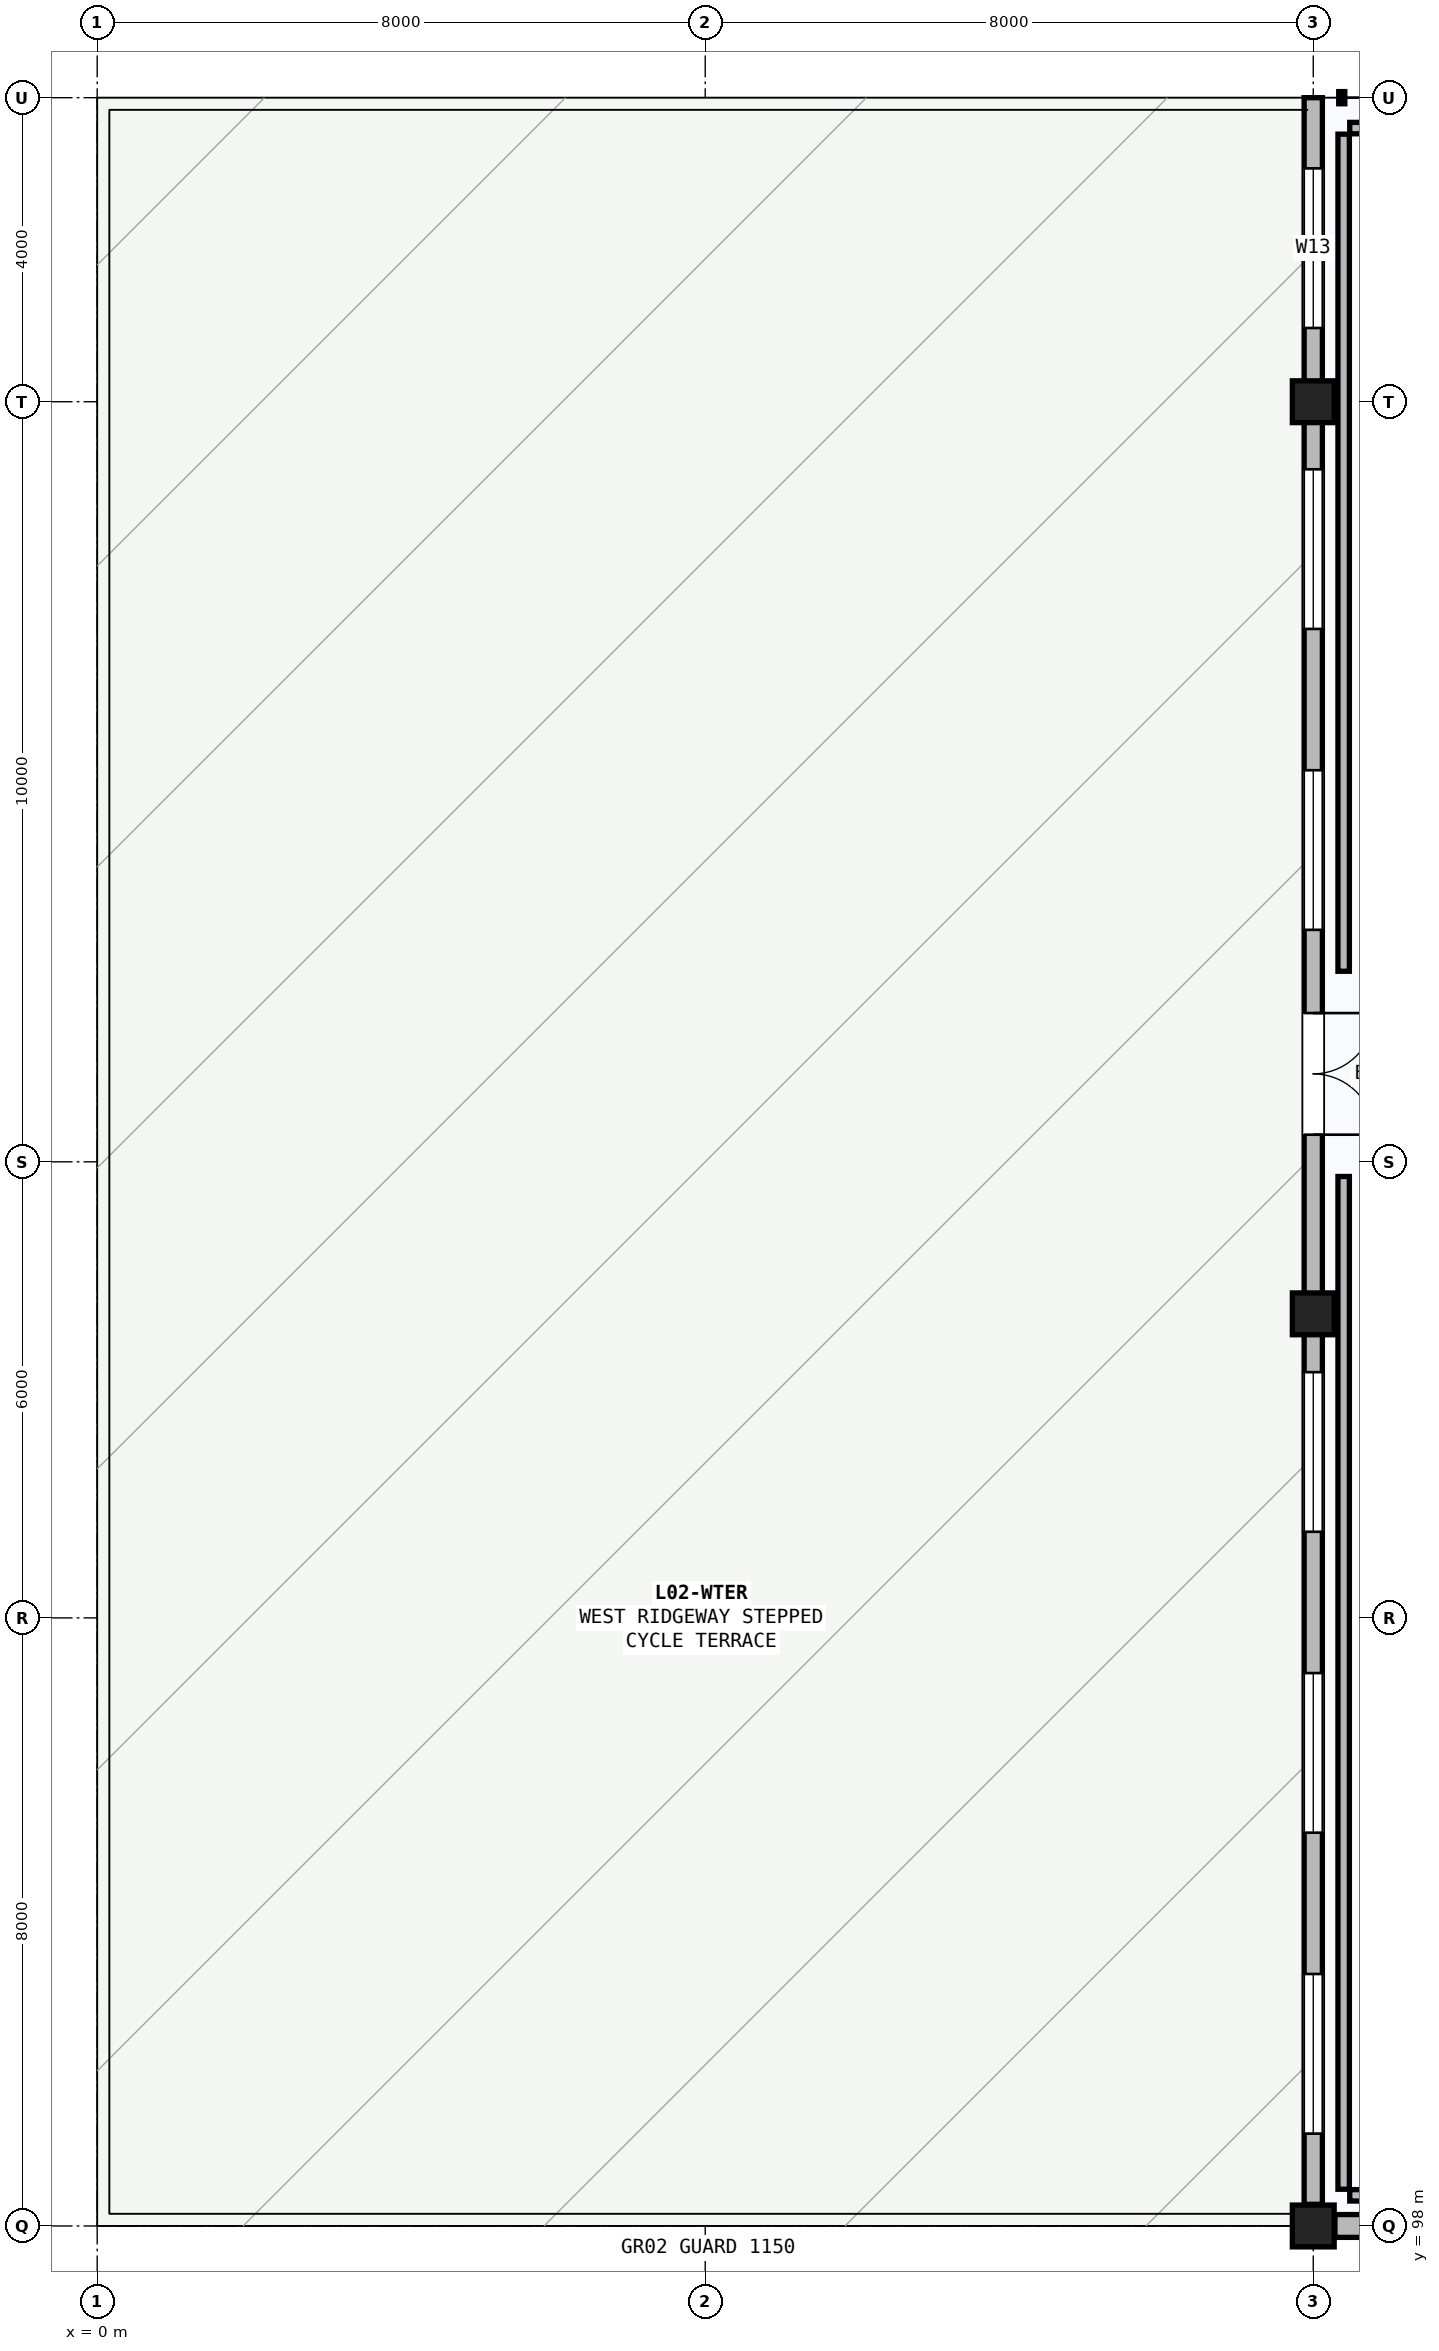
"""IFC4 building model, lengths in metres.
Left out: names, types, materials, properties, quantities, classifications, styles, units other than length and angle.
Written with IfcOpenShell. Run it as: python <this file> out.ifc"""

import sys

from ifc_helpers import new_model, si_unit, direction, frame, frame_2d, origin, origin_2d, place, context, subcontext, project, spatial, rectangle, extrude, element, fill, save


model = new_model("IFC4")
c1 = context("Model", 3, precision=1e-05, world=origin(), true_north=direction((0.0, 1.0)))
c2 = subcontext(c1, "Body", "Model", "MODEL_VIEW")
j1 = project(units=[si_unit("LENGTHUNIT", "METRE"), si_unit("PLANEANGLEUNIT", "RADIAN")], contexts=[c1])
p1 = place(None, origin())
s1 = spatial("IfcSite", under=j1, at=p1, CompositionType="ELEMENT")
p2 = place(p1, origin())
s2 = spatial("IfcBuilding", under=s1, at=p2, CompositionType="ELEMENT")
p3 = place(p2, frame((0.0, 0.0, 8.4)))
s3 = spatial("IfcBuildingStorey", under=s2, at=p3, CompositionType="ELEMENT", Elevation=8.4)
for number, where, z_axis, x_axis in (
    (1, (16.0, 98.0, 0.0), (0.0, 0.0, 1.0), (1.0, 0.0, 0.0)),
    (2, (16.0, 110.0, 0.0), (0.0, 0.0, 1.0), (1.0, 0.0, 0.0)),
    (3, (16.0, 122.0, 0.0), (0.0, 0.0, 1.0), (1.0, 0.0, 0.0)),
):
    element("IfcColumn", number, at=place(p3, frame(where, z_axis=z_axis, x_axis=x_axis)), inside=s3, PredefinedType="COLUMN", context=c2, shape_type="SweptSolid", body=[
        extrude(rectangle(XDim=0.55, YDim=0.55, at=origin_2d()), origin(), (0.0, 0.0, 1.0), 3.6),
    ])
p4 = place(p3, frame((16.285, 98.0, 0.0), z_axis=(0.0, 0.0, 1.0), x_axis=(1.0, 0.0, 0.0)))
e4 = element("IfcWall", 4, at=p4, inside=s3, PredefinedType="SOLIDWALL", context=c2, shape_type="SweptSolid", body=[
    extrude(rectangle(XDim=67.115, YDim=0.3, at=frame_2d((33.558, 0.0))), origin(), (0.0, 0.0, 1.0), 2.345),
])
p5 = place(p4, frame((0.814, 0.0, 0.645)))
e5 = element("IfcOpeningElement", 5, at=p5, cuts=e4, PredefinedType="OPENING", context=c2, shape_type="SweptSolid", body=[
    extrude(rectangle(XDim=2.1, YDim=1.5, at=frame_2d((1.05, 0.75))), frame((0.0, 0.16, 0.0), z_axis=(0.0, -1.0, 0.0), x_axis=(1.0, 0.0, 0.0)), (0.0, 0.0, 1.0), 0.32),
])
p6 = place(p4, frame((4.543, 0.0, 0.645)))
e6 = element("IfcOpeningElement", 6, at=p6, cuts=e4, PredefinedType="OPENING", context=c2, shape_type="SweptSolid", body=[
    extrude(rectangle(XDim=2.1, YDim=1.5, at=frame_2d((1.05, 0.75))), frame((0.0, 0.16, 0.0), z_axis=(0.0, -1.0, 0.0), x_axis=(1.0, 0.0, 0.0)), (0.0, 0.0, 1.0), 0.32),
])
p7 = place(p4, frame((8.272, 0.0, 0.645)))
e7 = element("IfcOpeningElement", 7, at=p7, cuts=e4, PredefinedType="OPENING", context=c2, shape_type="SweptSolid", body=[
    extrude(rectangle(XDim=2.1, YDim=1.5, at=frame_2d((1.05, 0.75))), frame((0.0, 0.16, 0.0), z_axis=(0.0, -1.0, 0.0), x_axis=(1.0, 0.0, 0.0)), (0.0, 0.0, 1.0), 0.32),
])
p8 = place(p4, frame((12.0, 0.0, 0.645)))
e8 = element("IfcOpeningElement", 8, at=p8, cuts=e4, PredefinedType="OPENING", context=c2, shape_type="SweptSolid", body=[
    extrude(rectangle(XDim=2.1, YDim=1.5, at=frame_2d((1.05, 0.75))), frame((0.0, 0.16, 0.0), z_axis=(0.0, -1.0, 0.0), x_axis=(1.0, 0.0, 0.0)), (0.0, 0.0, 1.0), 0.32),
])
p9 = place(p4, frame((19.457, 0.0, 0.645)))
e9 = element("IfcOpeningElement", 9, at=p9, cuts=e4, PredefinedType="OPENING", context=c2, shape_type="SweptSolid", body=[
    extrude(rectangle(XDim=2.1, YDim=1.5, at=frame_2d((1.05, 0.75))), frame((0.0, 0.16, 0.0), z_axis=(0.0, -1.0, 0.0), x_axis=(1.0, 0.0, 0.0)), (0.0, 0.0, 1.0), 0.32),
])
p10 = place(p4, frame((26.915, 0.0, 0.645)))
e10 = element("IfcOpeningElement", 10, at=p10, cuts=e4, PredefinedType="OPENING", context=c2, shape_type="SweptSolid", body=[
    extrude(rectangle(XDim=2.1, YDim=1.5, at=frame_2d((1.05, 0.75))), frame((0.0, 0.16, 0.0), z_axis=(0.0, -1.0, 0.0), x_axis=(1.0, 0.0, 0.0)), (0.0, 0.0, 1.0), 0.32),
])
p11 = place(p4, frame((34.372, 0.0, 0.645)))
e11 = element("IfcOpeningElement", 11, at=p11, cuts=e4, PredefinedType="OPENING", context=c2, shape_type="SweptSolid", body=[
    extrude(rectangle(XDim=2.1, YDim=1.5, at=frame_2d((1.05, 0.75))), frame((0.0, 0.16, 0.0), z_axis=(0.0, -1.0, 0.0), x_axis=(1.0, 0.0, 0.0)), (0.0, 0.0, 1.0), 0.32),
])
p12 = place(p4, frame((41.829, 0.0, 0.645)))
e12 = element("IfcOpeningElement", 12, at=p12, cuts=e4, PredefinedType="OPENING", context=c2, shape_type="SweptSolid", body=[
    extrude(rectangle(XDim=2.1, YDim=1.5, at=frame_2d((1.05, 0.75))), frame((0.0, 0.16, 0.0), z_axis=(0.0, -1.0, 0.0), x_axis=(1.0, 0.0, 0.0)), (0.0, 0.0, 1.0), 0.32),
])
p13 = place(p4, frame((49.286, 0.0, 0.645)))
e13 = element("IfcOpeningElement", 13, at=p13, cuts=e4, PredefinedType="OPENING", context=c2, shape_type="SweptSolid", body=[
    extrude(rectangle(XDim=2.1, YDim=1.5, at=frame_2d((1.05, 0.75))), frame((0.0, 0.16, 0.0), z_axis=(0.0, -1.0, 0.0), x_axis=(1.0, 0.0, 0.0)), (0.0, 0.0, 1.0), 0.32),
])
p14 = place(p4, frame((53.015, 0.0, 0.645)))
e14 = element("IfcOpeningElement", 14, at=p14, cuts=e4, PredefinedType="OPENING", context=c2, shape_type="SweptSolid", body=[
    extrude(rectangle(XDim=2.1, YDim=1.5, at=frame_2d((1.05, 0.75))), frame((0.0, 0.16, 0.0), z_axis=(0.0, -1.0, 0.0), x_axis=(1.0, 0.0, 0.0)), (0.0, 0.0, 1.0), 0.32),
])
p15 = place(p4, frame((56.743, 0.0, 0.645)))
e15 = element("IfcOpeningElement", 15, at=p15, cuts=e4, PredefinedType="OPENING", context=c2, shape_type="SweptSolid", body=[
    extrude(rectangle(XDim=2.1, YDim=1.5, at=frame_2d((1.05, 0.75))), frame((0.0, 0.16, 0.0), z_axis=(0.0, -1.0, 0.0), x_axis=(1.0, 0.0, 0.0)), (0.0, 0.0, 1.0), 0.32),
])
p16 = place(p4, frame((60.472, 0.0, 0.645)))
e16 = element("IfcOpeningElement", 16, at=p16, cuts=e4, PredefinedType="OPENING", context=c2, shape_type="SweptSolid", body=[
    extrude(rectangle(XDim=2.1, YDim=1.5, at=frame_2d((1.05, 0.75))), frame((0.0, 0.16, 0.0), z_axis=(0.0, -1.0, 0.0), x_axis=(1.0, 0.0, 0.0)), (0.0, 0.0, 1.0), 0.32),
])
p17 = place(p4, frame((64.201, 0.0, 0.645)))
e17 = element("IfcOpeningElement", 17, at=p17, cuts=e4, PredefinedType="OPENING", context=c2, shape_type="SweptSolid", body=[
    extrude(rectangle(XDim=2.1, YDim=1.5, at=frame_2d((1.05, 0.75))), frame((0.0, 0.16, 0.0), z_axis=(0.0, -1.0, 0.0), x_axis=(1.0, 0.0, 0.0)), (0.0, 0.0, 1.0), 0.32),
])
p18 = place(p3, frame((16.0, 126.0, 0.0), z_axis=(0.0, 0.0, 1.0), x_axis=(0.0, -1.0, 0.0)))
e18 = element("IfcWall", 18, at=p18, inside=s3, PredefinedType="SOLIDWALL", context=c2, shape_type="SweptSolid", body=[
    extrude(rectangle(XDim=27.715, YDim=0.24, at=frame_2d((13.857, 0.0))), origin(), (0.0, 0.0, 1.0), 2.345),
])
p19 = place(p18, frame((12.043, 0.0, 0.0)))
e19 = element("IfcOpeningElement", 19, at=p19, cuts=e18, PredefinedType="OPENING", context=c2, shape_type="SweptSolid", body=[
    extrude(rectangle(XDim=1.6, YDim=2.1, at=frame_2d((0.8, 1.05))), frame((0.0, 0.13, 0.0), z_axis=(0.0, -1.0, 0.0), x_axis=(1.0, 0.0, 0.0)), (0.0, 0.0, 1.0), 0.26),
])
p20 = place(p18, frame((0.93, 0.0, 0.35)))
e20 = element("IfcOpeningElement", 20, at=p20, cuts=e18, PredefinedType="OPENING", context=c2, shape_type="SweptSolid", body=[
    extrude(rectangle(XDim=2.1, YDim=1.8, at=frame_2d((1.05, 0.9))), frame((0.0, 0.13, 0.0), z_axis=(0.0, -1.0, 0.0), x_axis=(1.0, 0.0, 0.0)), (0.0, 0.0, 1.0), 0.26),
])
p21 = place(p18, frame((4.889, 0.0, 0.35)))
e21 = element("IfcOpeningElement", 21, at=p21, cuts=e18, PredefinedType="OPENING", context=c2, shape_type="SweptSolid", body=[
    extrude(rectangle(XDim=2.1, YDim=1.8, at=frame_2d((1.05, 0.9))), frame((0.0, 0.13, 0.0), z_axis=(0.0, -1.0, 0.0), x_axis=(1.0, 0.0, 0.0)), (0.0, 0.0, 1.0), 0.26),
])
p22 = place(p18, frame((8.848, 0.0, 0.35)))
e22 = element("IfcOpeningElement", 22, at=p22, cuts=e18, PredefinedType="OPENING", context=c2, shape_type="SweptSolid", body=[
    extrude(rectangle(XDim=2.1, YDim=1.8, at=frame_2d((1.05, 0.9))), frame((0.0, 0.13, 0.0), z_axis=(0.0, -1.0, 0.0), x_axis=(1.0, 0.0, 0.0)), (0.0, 0.0, 1.0), 0.26),
])
p23 = place(p18, frame((16.767, 0.0, 0.35)))
e23 = element("IfcOpeningElement", 23, at=p23, cuts=e18, PredefinedType="OPENING", context=c2, shape_type="SweptSolid", body=[
    extrude(rectangle(XDim=2.1, YDim=1.8, at=frame_2d((1.05, 0.9))), frame((0.0, 0.13, 0.0), z_axis=(0.0, -1.0, 0.0), x_axis=(1.0, 0.0, 0.0)), (0.0, 0.0, 1.0), 0.26),
])
p24 = place(p18, frame((20.726, 0.0, 0.35)))
e24 = element("IfcOpeningElement", 24, at=p24, cuts=e18, PredefinedType="OPENING", context=c2, shape_type="SweptSolid", body=[
    extrude(rectangle(XDim=2.1, YDim=1.8, at=frame_2d((1.05, 0.9))), frame((0.0, 0.13, 0.0), z_axis=(0.0, -1.0, 0.0), x_axis=(1.0, 0.0, 0.0)), (0.0, 0.0, 1.0), 0.26),
])
p25 = place(p18, frame((24.685, 0.0, 0.35)))
e25 = element("IfcOpeningElement", 25, at=p25, cuts=e18, PredefinedType="OPENING", context=c2, shape_type="SweptSolid", body=[
    extrude(rectangle(XDim=2.1, YDim=1.8, at=frame_2d((1.05, 0.9))), frame((0.0, 0.13, 0.0), z_axis=(0.0, -1.0, 0.0), x_axis=(1.0, 0.0, 0.0)), (0.0, 0.0, 1.0), 0.26),
])
p26 = place(p3, frame((16.48, 98.403, 0.0), z_axis=(0.0, 0.0, 1.0), x_axis=(1.0, 0.0, 0.0)))
e26 = element("IfcWall", 26, at=p26, inside=s3, PredefinedType="PARTITIONING", context=c2, shape_type="SweptSolid", body=[
    extrude(rectangle(XDim=29.637, YDim=0.15, at=frame_2d((14.818, 0.0))), origin(), (0.0, 0.0, 1.0), 2.345),
])
p27 = place(p3, frame((16.48, 125.6, 0.0), z_axis=(0.0, 0.0, 1.0), x_axis=(1.0, 0.0, 0.0)))
e27 = element("IfcWall", 27, at=p27, inside=s3, PredefinedType="PARTITIONING", context=c2, shape_type="SweptSolid", body=[
    extrude(rectangle(XDim=29.637, YDim=0.15, at=frame_2d((14.818, 0.0))), origin(), (0.0, 0.0, 1.0), 2.595),
])
p28 = place(p3, frame((16.4, 98.483, 0.0), z_axis=(0.0, 0.0, 1.0), x_axis=(0.0, 1.0, 0.0)))
e28 = element("IfcWall", 28, at=p28, inside=s3, PredefinedType="PARTITIONING", context=c2, shape_type="SweptSolid", body=[
    extrude(rectangle(XDim=13.324, YDim=0.15, at=frame_2d((6.662, 0.0))), origin(), (0.0, 0.0, 1.0), 2.345),
])
p29 = place(p3, frame((16.4, 114.507, 0.0), z_axis=(0.0, 0.0, 1.0), x_axis=(0.0, 1.0, 0.0)))
e29 = element("IfcWall", 29, at=p29, inside=s3, PredefinedType="PARTITIONING", context=c2, shape_type="SweptSolid", body=[
    extrude(rectangle(XDim=11.013, YDim=0.15, at=frame_2d((5.506, 0.0))), origin(), (0.0, 0.0, 1.0), 2.345),
])
p30 = place(p19, origin())
e30 = element("IfcDoor", 30, at=p30, inside=s3, OperationType="DOUBLE_DOOR_SINGLE_SWING", PredefinedType="DOOR", context=c2, shape_type="SweptSolid", body=[
    extrude(rectangle(XDim=1.6, YDim=2.1, at=frame_2d((0.8, 1.05))), frame((0.0, 0.025, 0.0), z_axis=(0.0, -1.0, 0.0), x_axis=(1.0, 0.0, 0.0)), (0.0, 0.0, 1.0), 0.05),
])
fill(e19, e30)
p31 = place(p20, origin())
e31 = element("IfcWindow", 31, at=p31, inside=s3, PartitioningType="SINGLE_PANEL", PredefinedType="WINDOW", context=c2, shape_type="SweptSolid", body=[
    extrude(rectangle(XDim=2.1, YDim=1.8, at=frame_2d((1.05, 0.9))), frame((0.0, 0.03, 0.0), z_axis=(0.0, -1.0, 0.0), x_axis=(1.0, 0.0, 0.0)), (0.0, 0.0, 1.0), 0.06),
])
fill(e20, e31)
p32 = place(p21, origin())
e32 = element("IfcWindow", 32, at=p32, inside=s3, PartitioningType="SINGLE_PANEL", PredefinedType="WINDOW", context=c2, shape_type="SweptSolid", body=[
    extrude(rectangle(XDim=2.1, YDim=1.8, at=frame_2d((1.05, 0.9))), frame((0.0, 0.03, 0.0), z_axis=(0.0, -1.0, 0.0), x_axis=(1.0, 0.0, 0.0)), (0.0, 0.0, 1.0), 0.06),
])
fill(e21, e32)
p33 = place(p22, origin())
e33 = element("IfcWindow", 33, at=p33, inside=s3, PartitioningType="SINGLE_PANEL", PredefinedType="WINDOW", context=c2, shape_type="SweptSolid", body=[
    extrude(rectangle(XDim=2.1, YDim=1.8, at=frame_2d((1.05, 0.9))), frame((0.0, 0.03, 0.0), z_axis=(0.0, -1.0, 0.0), x_axis=(1.0, 0.0, 0.0)), (0.0, 0.0, 1.0), 0.06),
])
fill(e22, e33)
p34 = place(p23, origin())
e34 = element("IfcWindow", 34, at=p34, inside=s3, PartitioningType="SINGLE_PANEL", PredefinedType="WINDOW", context=c2, shape_type="SweptSolid", body=[
    extrude(rectangle(XDim=2.1, YDim=1.8, at=frame_2d((1.05, 0.9))), frame((0.0, 0.03, 0.0), z_axis=(0.0, -1.0, 0.0), x_axis=(1.0, 0.0, 0.0)), (0.0, 0.0, 1.0), 0.06),
])
fill(e23, e34)
p35 = place(p24, origin())
e35 = element("IfcWindow", 35, at=p35, inside=s3, PartitioningType="SINGLE_PANEL", PredefinedType="WINDOW", context=c2, shape_type="SweptSolid", body=[
    extrude(rectangle(XDim=2.1, YDim=1.8, at=frame_2d((1.05, 0.9))), frame((0.0, 0.03, 0.0), z_axis=(0.0, -1.0, 0.0), x_axis=(1.0, 0.0, 0.0)), (0.0, 0.0, 1.0), 0.06),
])
fill(e24, e35)
p36 = place(p25, origin())
e36 = element("IfcWindow", 36, at=p36, inside=s3, PartitioningType="SINGLE_PANEL", PredefinedType="WINDOW", context=c2, shape_type="SweptSolid", body=[
    extrude(rectangle(XDim=2.1, YDim=1.8, at=frame_2d((1.05, 0.9))), frame((0.0, 0.03, 0.0), z_axis=(0.0, -1.0, 0.0), x_axis=(1.0, 0.0, 0.0)), (0.0, 0.0, 1.0), 0.06),
])
fill(e25, e36)
save(model, sys.argv[1])
